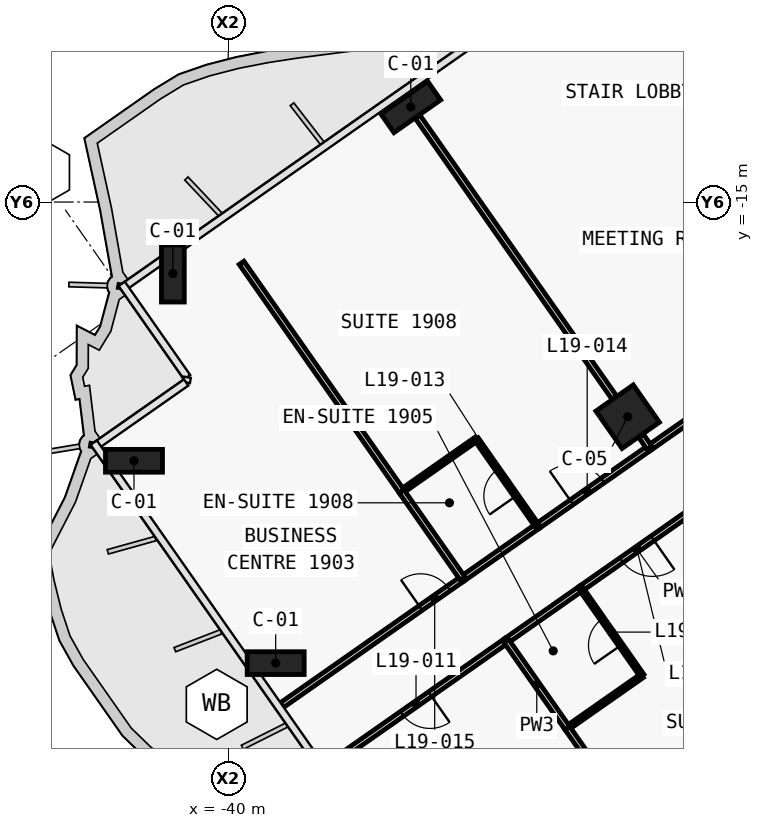
"""IFC4 building model, lengths in metres.
Left out: names, types, materials, properties, quantities, classifications, styles, units other than length and angle.
Written with IfcOpenShell. Run it as: python <this file> out.ifc"""

import sys

from ifc_helpers import new_model, si_unit, direction, frame, frame_2d, origin, origin_2d, place, context, subcontext, project, spatial, rectangle, extrude, clip, halfspace, element, fill, save


model = new_model("IFC4")
c1 = context("Model", 3, precision=1e-05, world=origin(), true_north=direction((0.0, 1.0)))
c2 = subcontext(c1, "Body", "Model", "MODEL_VIEW")
j1 = project(units=[si_unit("LENGTHUNIT", "METRE"), si_unit("PLANEANGLEUNIT", "RADIAN")], contexts=[c1])
p1 = place(None, origin())
s1 = spatial("IfcSite", under=j1, at=p1, CompositionType="ELEMENT")
p2 = place(p1, origin())
s2 = spatial("IfcBuilding", under=s1, at=p2, CompositionType="ELEMENT")
p3 = place(p2, frame((0.0, 0.0, 94.1)))
s3 = spatial("IfcBuildingStorey", under=s2, at=p3, CompositionType="ELEMENT", Elevation=94.1)
p4 = place(p3, frame((-35.197, -12.498, 0.0), z_axis=(0.0, 0.0, 1.0), x_axis=(-0.819152044289, -0.573576436351, 0.0)))
e1 = element("IfcColumn", 1, at=p4, inside=s3, PredefinedType="COLUMN", context=c2, shape_type="SweptSolid", body=[
    extrude(rectangle(XDim=1.5, YDim=0.6, at=origin_2d()), origin(), (0.0, 0.0, 1.0), 3.6),
])
p5 = place(p3, frame((-41.75, -17.087, 0.0), z_axis=(0.502908210177, 0.3521292646, 0.789359432166), x_axis=(-0.646611950122, -0.452748604756, 0.613931337245)))
e2 = element("IfcColumn", 2, at=p5, inside=s3, PredefinedType="COLUMN", context=c2, shape_type="Clipping", body=[
    clip(clip(extrude(rectangle(XDim=1.5, YDim=0.6, at=origin_2d()), origin(), (0.0, 0.0, 1.0), 4.561), halfspace(frame((0.0, 0.0, 0.583), z_axis=(0.0, 0.0, 1.0), x_axis=(1.0, 0.0, 0.0)), True)), halfspace(frame((0.0, 0.0, 3.977), z_axis=(0.0, 0.0, 1.0), x_axis=(1.0, 0.0, 0.0)), False)),
])
for number, where, z_axis, x_axis in (
    (3, (-38.869, -27.216, 0.0), (0.503, 0.352, 0.789), (-0.574, 0.819, 0.0)),
    (4, (-42.597, -21.892, 0.0), (0.503, 0.352, 0.789), (-0.574, 0.819, 0.0)),
):
    element("IfcColumn", number, at=place(p3, frame(where, z_axis=z_axis, x_axis=x_axis)), inside=s3, PredefinedType="COLUMN", context=c2, shape_type="Clipping", body=[
        clip(clip(extrude(rectangle(XDim=1.5, YDim=0.6, at=origin_2d()), origin(), (0.0, 0.0, 1.0), 4.561), halfspace(frame((0.0, 0.0, 0.233), z_axis=(0.0, 0.0, 1.0), x_axis=(1.0, 0.0, 0.0)), True)), halfspace(frame((0.0, 0.0, 4.327), z_axis=(0.0, 0.0, 1.0), x_axis=(1.0, 0.0, 0.0)), False)),
    ])
p6 = place(p3, frame((-29.49, -20.649, 0.0), z_axis=(0.0, 0.0, 1.0), x_axis=(-0.819152044289, -0.573576436351, 0.0)))
e5 = element("IfcColumn", 5, at=p6, inside=s3, PredefinedType="COLUMN", context=c2, shape_type="SweptSolid", body=[
    extrude(rectangle(XDim=1.2, YDim=1.2, at=origin_2d()), origin(), (0.0, 0.0, 1.0), 3.6),
])
p7 = place(p3, frame((-28.917, -21.469, 0.0), z_axis=(0.0, 0.0, 1.0), x_axis=(0.819152599934, 0.573575642807, 0.0)))
e6 = element("IfcWall", 6, at=p7, inside=s3, PredefinedType="PARTITIONING", context=c2, shape_type="SweptSolid", body=[
    extrude(rectangle(XDim=8.098, YDim=0.15, at=frame_2d((4.049, 0.0))), origin(), (0.0, 0.0, 1.0), 2.6),
])
p8 = place(p7, frame((3.599, 0.0, 0.0)))
e7 = element("IfcOpeningElement", 7, at=p8, cuts=e6, PredefinedType="OPENING", context=c2, shape_type="SweptSolid", body=[
    extrude(rectangle(XDim=0.9, YDim=2.1, at=frame_2d((0.45, 1.05))), frame((0.0, 0.085, 0.0), z_axis=(0.0, -1.0, 0.0), x_axis=(1.0, 0.0, 0.0)), (0.0, 0.0, 1.0), 0.17),
])
p9 = place(p3, frame((-31.866, -23.533, 0.0), z_axis=(0.0, 0.0, 1.0), x_axis=(0.819145961204, 0.573585123798, 0.0)))
e8 = element("IfcWall", 8, at=p9, inside=s3, PredefinedType="PARTITIONING", context=c2, shape_type="SweptSolid", body=[
    extrude(rectangle(XDim=3.603, YDim=0.15, at=frame_2d((1.802, 0.0))), origin(), (0.0, 0.0, 1.0), 2.6),
])
p10 = place(p9, frame((1.101, 0.0, 0.0)))
e9 = element("IfcOpeningElement", 9, at=p10, cuts=e8, PredefinedType="OPENING", context=c2, shape_type="SweptSolid", body=[
    extrude(rectangle(XDim=1.0, YDim=2.1, at=frame_2d((0.5, 1.05))), frame((0.0, 0.085, 0.0), z_axis=(0.0, -1.0, 0.0), x_axis=(1.0, 0.0, 0.0)), (0.0, 0.0, 1.0), 0.17),
])
p11 = place(p3, frame((-33.833, -24.91, 0.0), z_axis=(0.0, 0.0, 1.0), x_axis=(0.819146032251, 0.573585022335, 0.0)))
e10 = element("IfcWall", 10, at=p11, inside=s3, PredefinedType="PARTITIONING", context=c2, shape_type="SweptSolid", body=[
    extrude(rectangle(XDim=2.404, YDim=0.15, at=frame_2d((1.202, 0.0))), origin(), (0.0, 0.0, 1.0), 3.32),
])
p12 = place(p3, frame((-38.582, -28.236, 0.0), z_axis=(0.0, 0.0, 1.0), x_axis=(0.819150860942, 0.573578126342, 0.0)))
e11 = element("IfcWall", 11, at=p12, inside=s3, PredefinedType="PARTITIONING", context=c2, shape_type="SweptSolid", body=[
    extrude(rectangle(XDim=5.802, YDim=0.15, at=frame_2d((2.901, 0.0))), origin(), (0.0, 0.0, 1.0), 2.5),
])
p13 = place(p12, frame((4.451, 0.0, 0.0)))
e12 = element("IfcOpeningElement", 12, at=p13, cuts=e11, PredefinedType="OPENING", context=c2, shape_type="SweptSolid", body=[
    extrude(rectangle(XDim=0.9, YDim=2.1, at=frame_2d((0.45, 1.05))), frame((0.0, 0.085, 0.0), z_axis=(0.0, -1.0, 0.0), x_axis=(1.0, 0.0, 0.0)), (0.0, 0.0, 1.0), 0.17),
])
p14 = place(p3, frame((-27.767, -23.105, 0.0), z_axis=(0.0, 0.0, 1.0), x_axis=(-0.819145961204, -0.573585123798, 0.0)))
e13 = element("IfcWall", 13, at=p14, inside=s3, PredefinedType="PARTITIONING", context=c2, shape_type="SweptSolid", body=[
    extrude(rectangle(XDim=3.603, YDim=0.15, at=frame_2d((1.802, 0.0))), origin(), (0.0, 0.0, 1.0), 2.6),
])
p15 = place(p14, frame((1.302, 0.0, 0.0)))
e14 = element("IfcOpeningElement", 14, at=p15, cuts=e13, PredefinedType="OPENING", context=c2, shape_type="SweptSolid", body=[
    extrude(rectangle(XDim=1.0, YDim=2.1, at=frame_2d((0.5, 1.05))), frame((0.0, 0.085, 0.0), z_axis=(0.0, -1.0, 0.0), x_axis=(1.0, 0.0, 0.0)), (0.0, 0.0, 1.0), 0.17),
])
p16 = place(p3, frame((-30.716, -25.17, 0.0), z_axis=(0.0, 0.0, 1.0), x_axis=(-0.819146032251, -0.573585022335, 0.0)))
e15 = element("IfcWall", 15, at=p16, inside=s3, PredefinedType="PARTITIONING", context=c2, shape_type="SweptSolid", body=[
    extrude(rectangle(XDim=2.404, YDim=0.15, at=frame_2d((1.202, 0.0))), origin(), (0.0, 0.0, 1.0), 3.32),
])
p17 = place(p3, frame((-32.682, -26.546, 0.0), z_axis=(0.0, 0.0, 1.0), x_axis=(-0.819144934209, -0.573586590463, 0.0)))
e16 = element("IfcWall", 16, at=p17, inside=s3, PredefinedType="PARTITIONING", context=c2, shape_type="SweptSolid", body=[
    extrude(rectangle(XDim=5.802, YDim=0.15, at=frame_2d((2.901, 0.0))), origin(), (0.0, 0.0, 1.0), 2.5),
])
p18 = place(p17, frame((2.451, 0.0, 0.0)))
e17 = element("IfcOpeningElement", 17, at=p18, cuts=e16, PredefinedType="OPENING", context=c2, shape_type="SweptSolid", body=[
    extrude(rectangle(XDim=0.9, YDim=2.1, at=frame_2d((0.45, 1.05))), frame((0.0, 0.085, 0.0), z_axis=(0.0, -1.0, 0.0), x_axis=(1.0, 0.0, 0.0)), (0.0, 0.0, 1.0), 0.17),
])
p19 = place(p3, frame((-26.746, -12.014, 0.0), z_axis=(0.0, 0.0, 1.0), x_axis=(-0.573560650686, 0.819163097304, 0.0)))
e18 = element("IfcWall", 18, at=p19, inside=s3, PredefinedType="PARTITIONING", context=c2, shape_type="SweptSolid", body=[
    extrude(rectangle(XDim=3.0, YDim=0.15, at=frame_2d((1.5, 0.0))), origin(), (0.0, 0.0, 1.0), 3.32),
])
p20 = place(p3, frame((-28.916, -21.468, 0.0), z_axis=(0.0, 0.0, 1.0), x_axis=(-0.572944929411, 0.819593867633, 0.0)))
e19 = element("IfcWall", 19, at=p20, inside=s3, PredefinedType="PARTITIONING", context=c2, shape_type="SweptSolid", body=[
    extrude(rectangle(XDim=0.38, YDim=0.15, at=frame_2d((0.19, 0.0))), origin(), (0.0, 0.0, 1.0), 2.6),
])
p21 = place(p3, frame((-29.845, -20.141, 0.0), z_axis=(0.0, 0.0, 1.0), x_axis=(-0.573558725113, 0.819164445546, 0.0)))
e20 = element("IfcWall", 20, at=p21, inside=s3, PredefinedType="PARTITIONING", context=c2, shape_type="SweptSolid", body=[
    extrude(rectangle(XDim=9.01, YDim=0.15, at=frame_2d((4.505, 0.0))), origin(), (0.0, 0.0, 1.0), 2.6),
])
p22 = place(p3, frame((-31.864, -23.532, 0.0), z_axis=(0.0, 0.0, 1.0), x_axis=(-0.573550118428, 0.819170471667, 0.0)))
e21 = element("IfcWall", 21, at=p22, inside=s3, PredefinedType="PARTITIONING", context=c2, shape_type="SweptSolid", body=[
    extrude(rectangle(XDim=2.8, YDim=0.12, at=frame_2d((1.4, 0.0))), origin(), (0.0, 0.0, 1.0), 2.6),
])
p23 = place(p22, frame((0.975, 0.0, 0.0)))
e22 = element("IfcOpeningElement", 22, at=p23, cuts=e21, PredefinedType="OPENING", context=c2, shape_type="SweptSolid", body=[
    extrude(rectangle(XDim=0.85, YDim=2.05, at=frame_2d((0.425, 1.025))), frame((0.0, 0.07, 0.0), z_axis=(0.0, -1.0, 0.0), x_axis=(1.0, 0.0, 0.0)), (0.0, 0.0, 1.0), 0.14),
])
p24 = place(p3, frame((-33.471, -21.238, 0.0), z_axis=(0.0, 0.0, 1.0), x_axis=(-0.819141114317, -0.573592045652, 0.0)))
e23 = element("IfcWall", 23, at=p24, inside=s3, PredefinedType="PARTITIONING", context=c2, shape_type="SweptSolid", body=[
    extrude(rectangle(XDim=2.4, YDim=0.12, at=frame_2d((1.2, 0.0))), origin(), (0.0, 0.0, 1.0), 3.32),
])
p25 = place(p3, frame((-35.438, -22.615, 0.0), z_axis=(0.0, 0.0, 1.0), x_axis=(-0.573553832693, 0.819167871076, 0.0)))
e24 = element("IfcWall", 24, at=p25, inside=s3, PredefinedType="PARTITIONING", context=c2, shape_type="SweptSolid", body=[
    extrude(rectangle(XDim=7.343, YDim=0.15, at=frame_2d((3.671, 0.0))), origin(), (0.0, 0.0, 1.0), 3.32),
])
p26 = place(p3, frame((-33.831, -24.909, 0.0), z_axis=(0.0, 0.0, 1.0), x_axis=(-0.573550118428, 0.819170471667, 0.0)))
e25 = element("IfcWall", 25, at=p26, inside=s3, PredefinedType="PARTITIONING", context=c2, shape_type="SweptSolid", body=[
    extrude(rectangle(XDim=2.8, YDim=0.15, at=frame_2d((1.4, 0.0))), origin(), (0.0, 0.0, 1.0), 2.6),
])
p27 = place(p3, frame((-31.077, -28.842, 0.0), z_axis=(0.0, 0.0, 1.0), x_axis=(0.819188907105, 0.573523787192, 0.0)))
e26 = element("IfcWall", 26, at=p27, inside=s3, PredefinedType="PARTITIONING", context=c2, shape_type="SweptSolid", body=[
    extrude(rectangle(XDim=2.4, YDim=0.12, at=frame_2d((1.2, 0.0))), origin(), (0.0, 0.0, 1.0), 3.32),
])
p28 = place(p3, frame((-29.111, -27.464, 0.0), z_axis=(0.0, 0.0, 1.0), x_axis=(-0.573550118428, 0.819170471667, 0.0)))
e27 = element("IfcWall", 27, at=p28, inside=s3, PredefinedType="PARTITIONING", context=c2, shape_type="SweptSolid", body=[
    extrude(rectangle(XDim=2.8, YDim=0.12, at=frame_2d((1.4, 0.0))), origin(), (0.0, 0.0, 1.0), 3.32),
])
p29 = place(p28, frame((0.975, 0.0, 0.0)))
e28 = element("IfcOpeningElement", 28, at=p29, cuts=e27, PredefinedType="OPENING", context=c2, shape_type="SweptSolid", body=[
    extrude(rectangle(XDim=0.85, YDim=2.05, at=frame_2d((0.425, 1.025))), frame((0.0, 0.07, 0.0), z_axis=(0.0, -1.0, 0.0), x_axis=(1.0, 0.0, 0.0)), (0.0, 0.0, 1.0), 0.14),
])
p30 = place(p3, frame((-29.16, -31.58, 0.0), z_axis=(0.0, 0.0, 1.0), x_axis=(-0.57358488866, 0.819146125853, 0.0)))
e29 = element("IfcWall", 29, at=p30, inside=s3, PredefinedType="PARTITIONING", context=c2, shape_type="SweptSolid", body=[
    extrude(rectangle(XDim=3.343, YDim=0.15, at=frame_2d((1.671, 0.0))), origin(), (0.0, 0.0, 1.0), 3.32),
])
p31 = place(p3, frame((-31.078, -28.841, 0.0), z_axis=(0.0, 0.0, 1.0), x_axis=(-0.573550118428, 0.819170471667, 0.0)))
e30 = element("IfcWall", 30, at=p31, inside=s3, PredefinedType="PARTITIONING", context=c2, shape_type="SweptSolid", body=[
    extrude(rectangle(XDim=2.8, YDim=0.15, at=frame_2d((1.4, 0.0))), origin(), (0.0, 0.0, 1.0), 3.32),
])
p32 = place(p29, origin())
e31 = element("IfcDoor", 31, at=p32, inside=s3, OperationType="SINGLE_SWING_LEFT", PredefinedType="DOOR", context=c2, shape_type="SweptSolid", body=[
    extrude(rectangle(XDim=0.85, YDim=2.05, at=frame_2d((0.425, 1.025))), frame((0.0, 0.025, 0.0), z_axis=(0.0, -1.0, 0.0), x_axis=(1.0, 0.0, 0.0)), (0.0, 0.0, 1.0), 0.05),
])
fill(e28, e31)
p33 = place(p15, origin())
e32 = element("IfcDoor", 32, at=p33, inside=s3, OperationType="SINGLE_SWING_RIGHT", PredefinedType="DOOR", context=c2, shape_type="SweptSolid", body=[
    extrude(rectangle(XDim=1.0, YDim=2.1, at=frame_2d((0.5, 1.05))), frame((0.0, 0.025, 0.0), z_axis=(0.0, -1.0, 0.0), x_axis=(1.0, 0.0, 0.0)), (0.0, 0.0, 1.0), 0.05),
])
fill(e14, e32)
p34 = place(p18, origin())
e33 = element("IfcDoor", 33, at=p34, inside=s3, OperationType="SINGLE_SWING_RIGHT", PredefinedType="DOOR", context=c2, shape_type="SweptSolid", body=[
    extrude(rectangle(XDim=0.9, YDim=2.1, at=frame_2d((0.45, 1.05))), frame((0.0, 0.025, 0.0), z_axis=(0.0, -1.0, 0.0), x_axis=(1.0, 0.0, 0.0)), (0.0, 0.0, 1.0), 0.05),
])
fill(e17, e33)
p35 = place(p23, origin())
e34 = element("IfcDoor", 34, at=p35, inside=s3, OperationType="SINGLE_SWING_LEFT", PredefinedType="DOOR", context=c2, shape_type="SweptSolid", body=[
    extrude(rectangle(XDim=0.85, YDim=2.05, at=frame_2d((0.425, 1.025))), frame((0.0, 0.025, 0.0), z_axis=(0.0, -1.0, 0.0), x_axis=(1.0, 0.0, 0.0)), (0.0, 0.0, 1.0), 0.05),
])
fill(e22, e34)
p36 = place(p10, origin())
e35 = element("IfcDoor", 35, at=p36, inside=s3, OperationType="SINGLE_SWING_RIGHT", PredefinedType="DOOR", context=c2, shape_type="SweptSolid", body=[
    extrude(rectangle(XDim=1.0, YDim=2.1, at=frame_2d((0.5, 1.05))), frame((0.0, 0.025, 0.0), z_axis=(0.0, -1.0, 0.0), x_axis=(1.0, 0.0, 0.0)), (0.0, 0.0, 1.0), 0.05),
])
fill(e9, e35)
p37 = place(p13, origin())
e36 = element("IfcDoor", 36, at=p37, inside=s3, OperationType="SINGLE_SWING_RIGHT", PredefinedType="DOOR", context=c2, shape_type="SweptSolid", body=[
    extrude(rectangle(XDim=0.9, YDim=2.1, at=frame_2d((0.45, 1.05))), frame((0.0, 0.025, 0.0), z_axis=(0.0, -1.0, 0.0), x_axis=(1.0, 0.0, 0.0)), (0.0, 0.0, 1.0), 0.05),
])
fill(e12, e36)
save(model, sys.argv[1])
